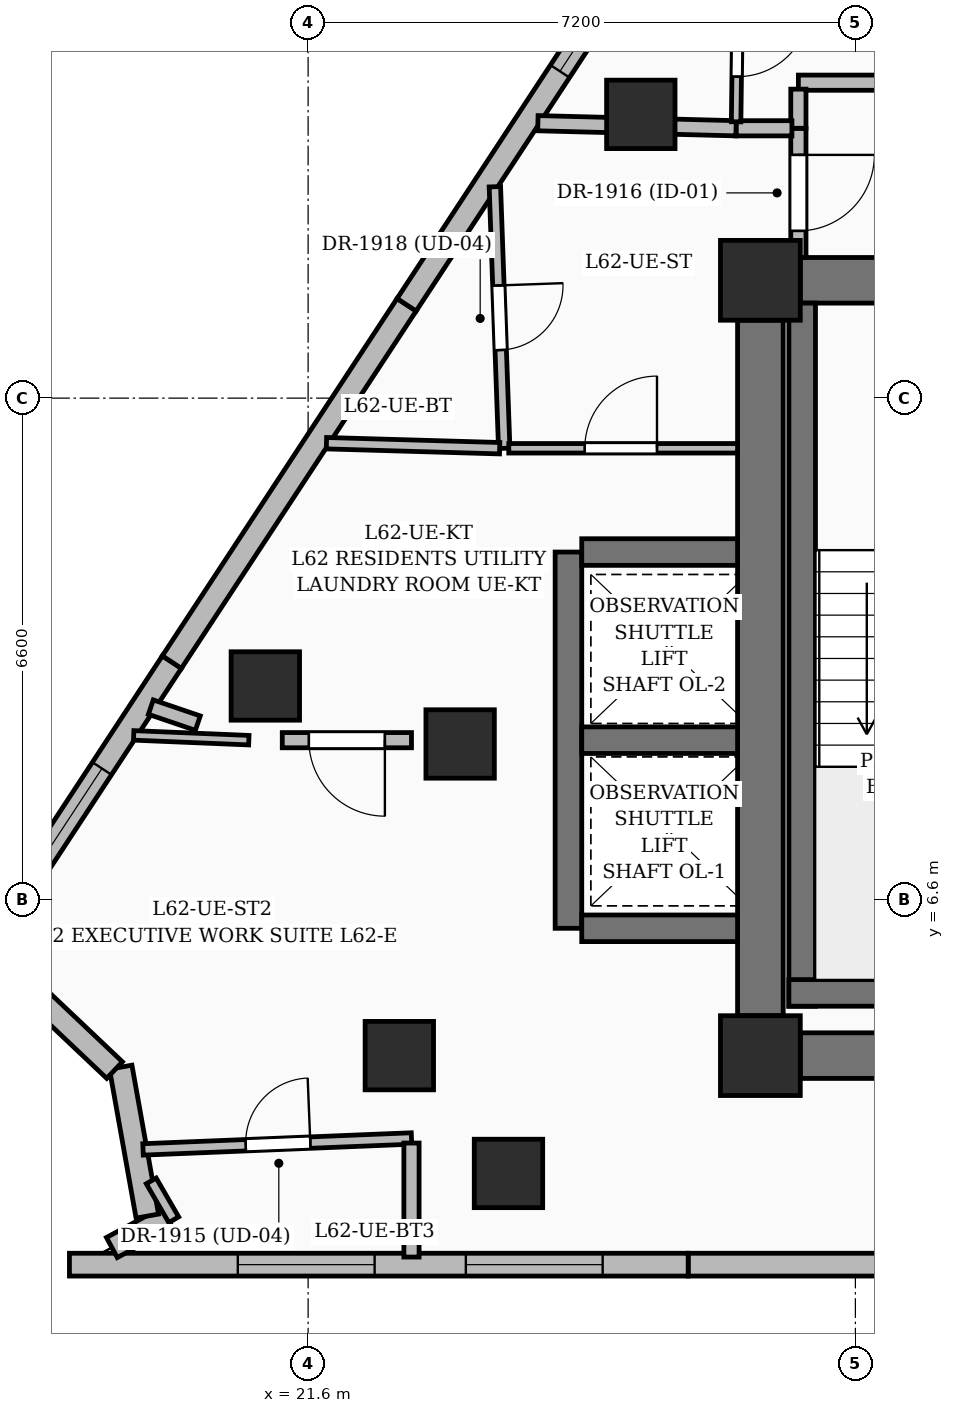
"""IFC4 building model, lengths in metres.
Left out: names, types, materials, properties, quantities, classifications, styles, units other than length and angle.
Written with IfcOpenShell. Run it as: python <this file> out.ifc"""

import sys

from ifc_helpers import new_model, si_unit, direction, frame, frame_2d, origin, origin_2d, place, context, subcontext, project, spatial, rectangle, extrude, element, fill, save


model = new_model("IFC4")
c1 = context("Model", 3, precision=1e-05, world=origin(), true_north=direction((0.0, 1.0)))
c2 = subcontext(c1, "Body", "Model", "MODEL_VIEW")
j1 = project(units=[si_unit("LENGTHUNIT", "METRE"), si_unit("PLANEANGLEUNIT", "RADIAN")], contexts=[c1])
p1 = place(None, origin())
s1 = spatial("IfcSite", under=j1, at=p1, CompositionType="ELEMENT")
p2 = place(p1, origin())
s2 = spatial("IfcBuilding", under=s1, at=p2, CompositionType="ELEMENT")
p3 = place(p2, frame((0.0, 0.0, 240.75)))
s3 = spatial("IfcBuildingStorey", under=s2, at=p3, CompositionType="ELEMENT", Elevation=240.75)
for number, where, z_axis, x_axis in (
    (1, (27.55, 4.55, 0.0), (0.0, 0.0, 1.0), (1.0, 0.0, 0.0)),
    (2, (27.55, 14.75, 0.0), (0.0, 0.0, 1.0), (1.0, 0.0, 0.0)),
):
    element("IfcColumn", number, at=place(p3, frame(where, z_axis=z_axis, x_axis=x_axis)), inside=s3, PredefinedType="COLUMN", context=c2, shape_type="SweptSolid", body=[
        extrude(rectangle(XDim=1.05, YDim=1.05, at=origin_2d()), origin(), (0.0, 0.0, 1.0), 3.75),
    ])
for number, where, z_axis, x_axis in (
    (3, (22.8, 4.55, 0.0), (0.0, 0.0, 1.0), (1.0, 0.0, 0.0)),
    (4, (23.6, 8.65, 0.0), (0.0, 0.0, 1.0), (1.0, 0.0, 0.0)),
):
    element("IfcColumn", number, at=place(p3, frame(where, z_axis=z_axis, x_axis=x_axis)), inside=s3, PredefinedType="COLUMN", context=c2, shape_type="SweptSolid", body=[
        extrude(rectangle(XDim=0.9, YDim=0.9, at=origin_2d()), origin(), (0.0, 0.0, 1.0), 3.75),
    ])
p4 = place(p3, frame((28.075, 4.55, 0.0), z_axis=(0.0, 0.0, 1.0), x_axis=(1.0, 0.0, 0.0)))
e5 = element("IfcWall", 5, at=p4, inside=s3, PredefinedType="SHEAR", context=c2, shape_type="SweptSolid", body=[
    extrude(rectangle(XDim=6.55, YDim=0.6, at=frame_2d((3.275, 0.0))), origin(), (0.0, 0.0, 1.0), 3.75),
])
p5 = place(p3, frame((28.075, 14.75, 0.0), z_axis=(0.0, 0.0, 1.0), x_axis=(1.0, 0.0, 0.0)))
e6 = element("IfcWall", 6, at=p5, inside=s3, PredefinedType="SHEAR", context=c2, shape_type="SweptSolid", body=[
    extrude(rectangle(XDim=6.55, YDim=0.6, at=frame_2d((3.275, 0.0))), origin(), (0.0, 0.0, 1.0), 3.75),
])
p6 = place(p5, frame((1.1, 0.0, 0.0)))
e7 = element("IfcOpeningElement", 7, at=p6, cuts=e6, PredefinedType="OPENING", context=c2, shape_type="SweptSolid", body=[
    extrude(rectangle(XDim=1.05, YDim=2.15, at=frame_2d((0.525, 1.075))), frame((0.0, 0.31, 0.0), z_axis=(0.0, -1.0, 0.0), x_axis=(1.0, 0.0, 0.0)), (0.0, 0.0, 1.0), 0.62),
])
p7 = place(p5, frame((5.46, 0.0, 0.0)))
e8 = element("IfcOpeningElement", 8, at=p7, cuts=e6, PredefinedType="OPENING", context=c2, shape_type="SweptSolid", body=[
    extrude(rectangle(XDim=0.95, YDim=2.15, at=frame_2d((0.475, 1.075))), frame((0.0, 0.31, 0.0), z_axis=(0.0, -1.0, 0.0), x_axis=(1.0, 0.0, 0.0)), (0.0, 0.0, 1.0), 0.62),
])
p8 = place(p3, frame((27.55, 5.075, 0.0), z_axis=(0.0, 0.0, 1.0), x_axis=(0.0, 1.0, 0.0)))
e9 = element("IfcWall", 9, at=p8, inside=s3, PredefinedType="SHEAR", context=c2, shape_type="SweptSolid", body=[
    extrude(rectangle(XDim=9.15, YDim=0.6, at=frame_2d((4.575, 0.0))), origin(), (0.0, 0.0, 1.0), 3.75),
])
p9 = place(p3, frame((28.1, 5.2, 0.0), z_axis=(0.0, 0.0, 1.0), x_axis=(0.0, 1.0, 0.0)))
e10 = element("IfcWall", 10, at=p9, inside=s3, PredefinedType="SOLIDWALL", context=c2, shape_type="SweptSolid", body=[
    extrude(rectangle(XDim=9.25, YDim=0.35, at=frame_2d((4.625, 0.0))), origin(), (0.0, 0.0, 1.0), 3.75),
])
p10 = place(p3, frame((27.925, 5.375, 0.0), z_axis=(0.0, 0.0, 1.0), x_axis=(1.0, 0.0, 0.0)))
e11 = element("IfcWall", 11, at=p10, inside=s3, PredefinedType="SOLIDWALL", context=c2, shape_type="SweptSolid", body=[
    extrude(rectangle(XDim=3.55, YDim=0.35, at=frame_2d((1.775, 0.0))), origin(), (0.0, 0.0, 1.0), 3.75),
])
p11 = place(p3, frame((25.025, 6.225, 0.0), z_axis=(0.0, 0.0, 1.0), x_axis=(0.0, 1.0, 0.0)))
e12 = element("IfcWall", 12, at=p11, inside=s3, PredefinedType="SOLIDWALL", context=c2, shape_type="SweptSolid", body=[
    extrude(rectangle(XDim=4.95, YDim=0.35, at=frame_2d((2.475, 0.0))), origin(), (0.0, 0.0, 1.0), 3.75),
])
for number, where, z_axis, x_axis in (
    (13, (25.2, 6.225, 0.0), (0.0, 0.0, 1.0), (1.0, 0.0, 0.0)),
    (14, (25.2, 8.7, 0.0), (0.0, 0.0, 1.0), (1.0, 0.0, 0.0)),
    (15, (25.2, 11.175, 0.0), (0.0, 0.0, 1.0), (1.0, 0.0, 0.0)),
):
    element("IfcWall", number, at=place(p3, frame(where, z_axis=z_axis, x_axis=x_axis)), inside=s3, PredefinedType="SOLIDWALL", context=c2, shape_type="SweptSolid", body=[
        extrude(rectangle(XDim=2.05, YDim=0.35, at=frame_2d((1.025, 0.0))), origin(), (0.0, 0.0, 1.0), 3.75),
    ])
for number, where, z_axis, x_axis in (
    (16, (24.236, 3.0, 0.0), (0.0, 0.0, 1.0), (1.0, 0.0, 0.0)),
    (17, (25.977, 16.933, 0.0), (0.0, 0.0, 1.0), (1.0, 0.0, 0.0)),
    (18, (21.037, 9.413, 0.0), (0.0, 0.0, 1.0), (1.0, 0.0, 0.0)),
):
    element("IfcColumn", number, at=place(p3, frame(where, z_axis=z_axis, x_axis=x_axis)), inside=s3, PredefinedType="COLUMN", context=c2, shape_type="SweptSolid", body=[
        extrude(rectangle(XDim=0.9, YDim=0.9, at=origin_2d()), origin(), (0.0, 0.0, 1.0), 3.75),
    ])
p12 = place(p3, frame((34.465, 1.8, 0.0), z_axis=(0.0, 0.0, 1.0), x_axis=(-1.0, 0.0, 0.0)))
e19 = element("IfcWall", 19, at=p12, inside=s3, PredefinedType="SOLIDWALL", context=c2, shape_type="SweptSolid", body=[
    extrude(rectangle(XDim=7.865, YDim=0.3, at=frame_2d((3.933, 0.0))), origin(), (0.0, 0.0, 1.0), 3.5),
])
p13 = place(p12, frame((2.7, 0.0, 0.55)))
e20 = element("IfcOpeningElement", 20, at=p13, cuts=e19, PredefinedType="OPENING", context=c2, shape_type="SweptSolid", body=[
    extrude(rectangle(XDim=2.1, YDim=2.4, at=frame_2d((1.05, 1.2))), frame((0.0, 0.16, 0.0), z_axis=(0.0, -1.0, 0.0), x_axis=(1.0, 0.0, 0.0)), (0.0, 0.0, 1.0), 0.32),
])
p14 = place(p3, frame((26.6, 1.8, 0.0), z_axis=(0.0, 0.0, 1.0), x_axis=(-1.0, 0.0, 0.0)))
e21 = element("IfcWall", 21, at=p14, inside=s3, PredefinedType="SOLIDWALL", context=c2, shape_type="SweptSolid", body=[
    extrude(rectangle(XDim=8.14, YDim=0.3, at=frame_2d((4.07, 0.0))), origin(), (0.0, 0.0, 1.0), 3.5),
])
p15 = place(p14, frame((4.125, 0.0, 0.6)))
e22 = element("IfcOpeningElement", 22, at=p15, cuts=e21, PredefinedType="OPENING", context=c2, shape_type="SweptSolid", body=[
    extrude(rectangle(XDim=1.8, YDim=2.1, at=frame_2d((0.9, 1.05))), frame((0.0, 0.16, 0.0), z_axis=(0.0, -1.0, 0.0), x_axis=(1.0, 0.0, 0.0)), (0.0, 0.0, 1.0), 0.32),
])
p16 = place(p14, frame((1.125, 0.0, 0.6)))
e23 = element("IfcOpeningElement", 23, at=p16, cuts=e21, PredefinedType="OPENING", context=c2, shape_type="SweptSolid", body=[
    extrude(rectangle(XDim=1.8, YDim=2.1, at=frame_2d((0.9, 1.05))), frame((0.0, 0.16, 0.0), z_axis=(0.0, -1.0, 0.0), x_axis=(1.0, 0.0, 0.0)), (0.0, 0.0, 1.0), 0.32),
])
p17 = place(p3, frame((19.018, 2.025, 0.0), z_axis=(0.0, 0.0, 1.0), x_axis=(0.880196276444, 0.474609855496, 0.0)))
e24 = element("IfcWall", 24, at=p17, inside=s3, PredefinedType="SOLIDWALL", context=c2, shape_type="SweptSolid", body=[
    extrude(rectangle(XDim=0.828, YDim=0.3, at=frame_2d((0.414, 0.0))), origin(), (0.0, 0.0, 1.0), 3.5),
])
p18 = place(p3, frame((19.485, 2.439, 0.0), z_axis=(0.0, 0.0, 1.0), x_axis=(-0.175926512458, 0.984403302623, 0.0)))
e25 = element("IfcWall", 25, at=p18, inside=s3, PredefinedType="SOLIDWALL", context=c2, shape_type="SweptSolid", body=[
    extrude(rectangle(XDim=1.99, YDim=0.3, at=frame_2d((0.995, 0.0))), origin(), (0.0, 0.0, 1.0), 3.5),
])
p19 = place(p3, frame((19.054, 4.36, 0.0), z_axis=(0.0, 0.0, 1.0), x_axis=(-0.726119894398, 0.68756810496, 0.0)))
e26 = element("IfcWall", 26, at=p19, inside=s3, PredefinedType="SOLIDWALL", context=c2, shape_type="SweptSolid", body=[
    extrude(rectangle(XDim=1.995, YDim=0.3, at=frame_2d((0.998, 0.0))), origin(), (0.0, 0.0, 1.0), 3.5),
])
p20 = place(p3, frame((17.062, 5.548, 0.0), z_axis=(0.0, 0.0, 1.0), x_axis=(0.549053158856, 0.835787430361, 0.0)))
e27 = element("IfcWall", 27, at=p20, inside=s3, PredefinedType="SOLIDWALL", context=c2, shape_type="SweptSolid", body=[
    extrude(rectangle(XDim=5.0, YDim=0.3, at=frame_2d((2.5, 0.0))), origin(), (0.0, 0.0, 1.0), 3.5),
])
p21 = place(p20, frame((1.225, 0.0, 0.55)))
e28 = element("IfcOpeningElement", 28, at=p21, cuts=e27, PredefinedType="OPENING", context=c2, shape_type="SweptSolid", body=[
    extrude(rectangle(XDim=2.1, YDim=2.4, at=frame_2d((1.05, 1.2))), frame((0.0, 0.16, 0.0), z_axis=(0.0, -1.0, 0.0), x_axis=(1.0, 0.0, 0.0)), (0.0, 0.0, 1.0), 0.32),
])
p22 = place(p3, frame((19.807, 9.727, 0.0), z_axis=(0.0, 0.0, 1.0), x_axis=(0.549047957694, 0.835790847134, 0.0)))
e29 = element("IfcWall", 29, at=p22, inside=s3, PredefinedType="SOLIDWALL", context=c2, shape_type="SweptSolid", body=[
    extrude(rectangle(XDim=5.625, YDim=0.3, at=frame_2d((2.812, 0.0))), origin(), (0.0, 0.0, 1.0), 3.5),
])
p23 = place(p3, frame((22.896, 14.428, 0.0), z_axis=(0.0, 0.0, 1.0), x_axis=(0.549084999381, 0.835766512523, 0.0)))
e30 = element("IfcWall", 30, at=p23, inside=s3, PredefinedType="SOLIDWALL", context=c2, shape_type="SweptSolid", body=[
    extrude(rectangle(XDim=5.35, YDim=0.3, at=frame_2d((2.675, 0.0))), origin(), (0.0, 0.0, 1.0), 3.5),
])
p24 = place(p23, frame((3.675, 0.0, 0.8)))
e31 = element("IfcOpeningElement", 31, at=p24, cuts=e30, PredefinedType="OPENING", context=c2, shape_type="SweptSolid", body=[
    extrude(rectangle(XDim=1.2, YDim=1.8, at=frame_2d((0.6, 0.9))), frame((0.0, 0.16, 0.0), z_axis=(0.0, -1.0, 0.0), x_axis=(1.0, 0.0, 0.0)), (0.0, 0.0, 1.0), 0.32),
])
p25 = place(p3, frame((28.05, 16.75, 0.0), z_axis=(0.0, 0.0, 1.0), x_axis=(0.0, -1.0, 0.0)))
e32 = element("IfcWall", 32, at=p25, inside=s3, PredefinedType="PARTITIONING", context=c2, shape_type="SweptSolid", body=[
    extrude(rectangle(XDim=1.7, YDim=0.2, at=frame_2d((0.85, 0.0))), origin(), (0.0, 0.0, 1.0), 3.5),
])
p26 = place(p25, frame((0.35, 0.0, 0.0)))
e33 = element("IfcOpeningElement", 33, at=p26, cuts=e32, PredefinedType="OPENING", context=c2, shape_type="SweptSolid", body=[
    extrude(rectangle(XDim=1.0, YDim=2.2, at=frame_2d((0.5, 1.1))), frame((0.0, 0.11, 0.0), z_axis=(0.0, -1.0, 0.0), x_axis=(1.0, 0.0, 0.0)), (0.0, 0.0, 1.0), 0.22),
])
p27 = place(p3, frame((34.02, 17.35, 0.0), z_axis=(0.0, 0.0, 1.0), x_axis=(-1.0, 0.0, 0.0)))
e34 = element("IfcWall", 34, at=p27, inside=s3, PredefinedType="PARTITIONING", context=c2, shape_type="SweptSolid", body=[
    extrude(rectangle(XDim=5.97, YDim=0.2, at=frame_2d((2.985, 0.0))), origin(), (0.0, 0.0, 1.0), 2.685),
])
p28 = place(p27, frame((2.485, 0.0, 0.0)))
e35 = element("IfcOpeningElement", 35, at=p28, cuts=e34, PredefinedType="OPENING", context=c2, shape_type="SweptSolid", body=[
    extrude(rectangle(XDim=1.0, YDim=2.2, at=frame_2d((0.5, 1.1))), frame((0.0, 0.11, 0.0), z_axis=(0.0, -1.0, 0.0), x_axis=(1.0, 0.0, 0.0)), (0.0, 0.0, 1.0), 0.22),
])
p29 = place(p3, frame((28.05, 17.265, 0.0), z_axis=(0.0, 0.0, 1.0), x_axis=(0.0, -1.0, 0.0)))
e36 = element("IfcWall", 36, at=p29, inside=s3, PredefinedType="PARTITIONING", context=c2, shape_type="SweptSolid", body=[
    extrude(rectangle(XDim=0.515, YDim=0.2, at=frame_2d((0.257, 0.0))), origin(), (0.0, 0.0, 1.0), 3.5),
])
p30 = place(p3, frame((19.428, 3.316, 0.0), z_axis=(0.0, 0.0, 1.0), x_axis=(0.999169430966, 0.040748597793, 0.0)))
e37 = element("IfcWall", 37, at=p30, inside=s3, PredefinedType="PARTITIONING", context=c2, shape_type="SweptSolid", body=[
    extrude(rectangle(XDim=3.535, YDim=0.15, at=frame_2d((1.768, 0.0))), origin(), (0.0, 0.0, 1.0), 3.5),
])
p31 = place(p30, frame((1.353, 0.0, 0.0)))
e38 = element("IfcOpeningElement", 38, at=p31, cuts=e37, PredefinedType="OPENING", context=c2, shape_type="SweptSolid", body=[
    extrude(rectangle(XDim=0.85, YDim=2.1, at=frame_2d((0.425, 1.05))), frame((0.0, 0.085, 0.0), z_axis=(0.0, -1.0, 0.0), x_axis=(1.0, 0.0, 0.0)), (0.0, 0.0, 1.0), 0.17),
])
p32 = place(p3, frame((20.149, 8.925, 0.0), z_axis=(0.0, 0.0, 1.0), x_axis=(-0.946606200233, 0.322392155117, 0.0)))
e39 = element("IfcWall", 39, at=p32, inside=s3, PredefinedType="PARTITIONING", context=c2, shape_type="SweptSolid", body=[
    extrude(rectangle(XDim=0.653, YDim=0.2, at=frame_2d((0.326, 0.0))), origin(), (0.0, 0.0, 1.0), 3.5),
])
p33 = place(p3, frame((22.96, 8.7, 0.0), z_axis=(0.0, 0.0, 1.0), x_axis=(-1.0, 0.0, 0.0)))
e40 = element("IfcWall", 40, at=p33, inside=s3, PredefinedType="PARTITIONING", context=c2, shape_type="SweptSolid", body=[
    extrude(rectangle(XDim=1.7, YDim=0.2, at=frame_2d((0.85, 0.0))), origin(), (0.0, 0.0, 1.0), 2.764),
])
p34 = place(p33, frame((0.35, 0.0, 0.0)))
e41 = element("IfcOpeningElement", 41, at=p34, cuts=e40, PredefinedType="OPENING", context=c2, shape_type="SweptSolid", body=[
    extrude(rectangle(XDim=1.0, YDim=2.2, at=frame_2d((0.5, 1.1))), frame((0.0, 0.11, 0.0), z_axis=(0.0, -1.0, 0.0), x_axis=(1.0, 0.0, 0.0)), (0.0, 0.0, 1.0), 0.22),
])
p35 = place(p3, frame((22.96, 1.9, 0.0), z_axis=(0.0, 0.0, 1.0), x_axis=(0.0, 1.0, 0.0)))
e42 = element("IfcWall", 42, at=p35, inside=s3, PredefinedType="PARTITIONING", context=c2, shape_type="SweptSolid", body=[
    extrude(rectangle(XDim=1.5, YDim=0.2, at=frame_2d((0.75, 0.0))), origin(), (0.0, 0.0, 1.0), 3.5),
])
p36 = place(p3, frame((24.057, 15.981, 0.0), z_axis=(0.0, 0.0, 1.0), x_axis=(0.035737055387, -0.999361227421, 0.0)))
e43 = element("IfcWall", 43, at=p36, inside=s3, PredefinedType="PARTITIONING", context=c2, shape_type="SweptSolid", body=[
    extrude(rectangle(XDim=3.443, YDim=0.15, at=frame_2d((1.722, 0.0))), origin(), (0.0, 0.0, 1.0), 2.82),
])
p37 = place(p36, frame((1.3, 0.0, 0.0)))
e44 = element("IfcOpeningElement", 44, at=p37, cuts=e43, PredefinedType="OPENING", context=c2, shape_type="SweptSolid", body=[
    extrude(rectangle(XDim=0.85, YDim=2.1, at=frame_2d((0.425, 1.05))), frame((0.0, 0.085, 0.0), z_axis=(0.0, -1.0, 0.0), x_axis=(1.0, 0.0, 0.0)), (0.0, 0.0, 1.0), 0.17),
])
p38 = place(p3, frame((24.24, 12.54, 0.0), z_axis=(0.0, 0.0, 1.0), x_axis=(1.0, 0.0, 0.0)))
e45 = element("IfcWall", 45, at=p38, inside=s3, PredefinedType="PARTITIONING", context=c2, shape_type="SweptSolid", body=[
    extrude(rectangle(XDim=3.01, YDim=0.125, at=frame_2d((1.505, 0.0))), origin(), (0.0, 0.0, 1.0), 3.5),
])
p39 = place(p38, frame((1.0, 0.0, 0.0)))
e46 = element("IfcOpeningElement", 46, at=p39, cuts=e45, PredefinedType="OPENING", context=c2, shape_type="SweptSolid", body=[
    extrude(rectangle(XDim=0.95, YDim=2.2, at=frame_2d((0.475, 1.1))), frame((0.0, 0.072, 0.0), z_axis=(0.0, -1.0, 0.0), x_axis=(1.0, 0.0, 0.0)), (0.0, 0.0, 1.0), 0.145),
])
p40 = place(p3, frame((27.965, 16.75, 0.0), z_axis=(0.0, 0.0, 1.0), x_axis=(-1.0, 0.0, 0.0)))
e47 = element("IfcWall", 47, at=p40, inside=s3, PredefinedType="PARTITIONING", context=c2, shape_type="SweptSolid", body=[
    extrude(rectangle(XDim=0.735, YDim=0.2, at=frame_2d((0.368, 0.0))), origin(), (0.0, 0.0, 1.0), 3.5),
])
p41 = place(p3, frame((27.23, 16.75, 0.0), z_axis=(0.0, 0.0, 1.0), x_axis=(-0.999670938638, 0.025651792207, 0.0)))
e48 = element("IfcWall", 48, at=p41, inside=s3, PredefinedType="PARTITIONING", context=c2, shape_type="SweptSolid", body=[
    extrude(rectangle(XDim=2.608, YDim=0.2, at=frame_2d((1.304, 0.0))), origin(), (0.0, 0.0, 1.0), 3.5),
])
p42 = place(p3, frame((21.841, 12.607, 0.0), z_axis=(0.0, 0.0, 1.0), x_axis=(0.999585069317, -0.028804326047, 0.0)))
e49 = element("IfcWall", 49, at=p42, inside=s3, PredefinedType="PARTITIONING", context=c2, shape_type="SweptSolid", body=[
    extrude(rectangle(XDim=2.28, YDim=0.15, at=frame_2d((1.14, 0.0))), origin(), (0.0, 0.0, 1.0), 2.82),
])
p43 = place(p3, frame((27.254, 18.636, 0.0), z_axis=(0.0, 0.0, 1.0), x_axis=(-0.012876795935, -0.999917090626, 0.0)))
e50 = element("IfcWall", 50, at=p43, inside=s3, PredefinedType="PARTITIONING", context=c2, shape_type="SweptSolid", body=[
    extrude(rectangle(XDim=1.801, YDim=0.125, at=frame_2d((0.901, 0.0))), origin(), (0.0, 0.0, 1.0), 2.82),
])
p44 = place(p43, frame((0.257, 0.0, 0.0)))
e51 = element("IfcOpeningElement", 51, at=p44, cuts=e50, PredefinedType="OPENING", context=c2, shape_type="SweptSolid", body=[
    extrude(rectangle(XDim=0.95, YDim=2.2, at=frame_2d((0.475, 1.1))), frame((0.0, 0.072, 0.0), z_axis=(0.0, -1.0, 0.0), x_axis=(1.0, 0.0, 0.0)), (0.0, 0.0, 1.0), 0.145),
])
p45 = place(p3, frame((20.82, 8.7, 0.0), z_axis=(0.0, 0.0, 1.0), x_axis=(-0.999136974993, 0.041536793353, 0.0)))
e52 = element("IfcWall", 52, at=p45, inside=s3, PredefinedType="PARTITIONING", context=c2, shape_type="SweptSolid", body=[
    extrude(rectangle(XDim=1.516, YDim=0.125, at=frame_2d((0.758, 0.0))), origin(), (0.0, 0.0, 1.0), 3.5),
])
p46 = place(p3, frame((19.536, 2.902, 0.0), z_axis=(0.0, 0.0, 1.0), x_axis=(0.501427298818, -0.865199782709, 0.0)))
e53 = element("IfcWall", 53, at=p46, inside=s3, PredefinedType="PARTITIONING", context=c2, shape_type="SweptSolid", body=[
    extrude(rectangle(XDim=0.591, YDim=0.15, at=frame_2d((0.295, 0.0))), origin(), (0.0, 0.0, 1.0), 3.5),
])
p47 = place(p15, origin())
e54 = element("IfcWindow", 54, at=p47, inside=s3, PartitioningType="SINGLE_PANEL", PredefinedType="WINDOW", context=c2, shape_type="SweptSolid", body=[
    extrude(rectangle(XDim=1.8, YDim=2.1, at=frame_2d((0.9, 1.05))), frame((0.0, 0.03, 0.0), z_axis=(0.0, -1.0, 0.0), x_axis=(1.0, 0.0, 0.0)), (0.0, 0.0, 1.0), 0.06),
])
fill(e22, e54)
p48 = place(p16, origin())
e55 = element("IfcWindow", 55, at=p48, inside=s3, PartitioningType="SINGLE_PANEL", PredefinedType="WINDOW", context=c2, shape_type="SweptSolid", body=[
    extrude(rectangle(XDim=1.8, YDim=2.1, at=frame_2d((0.9, 1.05))), frame((0.0, 0.03, 0.0), z_axis=(0.0, -1.0, 0.0), x_axis=(1.0, 0.0, 0.0)), (0.0, 0.0, 1.0), 0.06),
])
fill(e23, e55)
p49 = place(p21, origin())
e56 = element("IfcWindow", 56, at=p49, inside=s3, PartitioningType="SINGLE_PANEL", PredefinedType="WINDOW", context=c2, shape_type="SweptSolid", body=[
    extrude(rectangle(XDim=2.1, YDim=2.4, at=frame_2d((1.05, 1.2))), frame((0.0, 0.03, 0.0), z_axis=(0.0, -1.0, 0.0), x_axis=(1.0, 0.0, 0.0)), (0.0, 0.0, 1.0), 0.06),
])
fill(e28, e56)
p50 = place(p24, origin())
e57 = element("IfcWindow", 57, at=p50, inside=s3, PartitioningType="SINGLE_PANEL", PredefinedType="WINDOW", context=c2, shape_type="SweptSolid", body=[
    extrude(rectangle(XDim=1.2, YDim=1.8, at=frame_2d((0.6, 0.9))), frame((0.0, 0.03, 0.0), z_axis=(0.0, -1.0, 0.0), x_axis=(1.0, 0.0, 0.0)), (0.0, 0.0, 1.0), 0.06),
])
fill(e31, e57)
p51 = place(p31, origin())
e58 = element("IfcDoor", 58, at=p51, inside=s3, OperationType="SINGLE_SWING_RIGHT", PredefinedType="DOOR", context=c2, shape_type="SweptSolid", body=[
    extrude(rectangle(XDim=0.85, YDim=2.1, at=frame_2d((0.425, 1.05))), frame((0.0, 0.025, 0.0), z_axis=(0.0, -1.0, 0.0), x_axis=(1.0, 0.0, 0.0)), (0.0, 0.0, 1.0), 0.05),
])
fill(e38, e58)
p52 = place(p26, origin())
e59 = element("IfcDoor", 59, at=p52, inside=s3, OperationType="SINGLE_SWING_LEFT", PredefinedType="DOOR", context=c2, shape_type="SweptSolid", body=[
    extrude(rectangle(XDim=1.0, YDim=2.2, at=frame_2d((0.5, 1.1))), frame((0.0, 0.025, 0.0), z_axis=(0.0, -1.0, 0.0), x_axis=(1.0, 0.0, 0.0)), (0.0, 0.0, 1.0), 0.05),
])
fill(e33, e59)
p53 = place(p39, origin())
e60 = element("IfcDoor", 60, at=p53, inside=s3, OperationType="SINGLE_SWING_RIGHT", PredefinedType="DOOR", context=c2, shape_type="SweptSolid", body=[
    extrude(rectangle(XDim=0.95, YDim=2.2, at=frame_2d((0.475, 1.1))), frame((0.0, 0.025, 0.0), z_axis=(0.0, -1.0, 0.0), x_axis=(1.0, 0.0, 0.0)), (0.0, 0.0, 1.0), 0.05),
])
fill(e46, e60)
p54 = place(p37, origin())
e61 = element("IfcDoor", 61, at=p54, inside=s3, OperationType="SINGLE_SWING_LEFT", PredefinedType="DOOR", context=c2, shape_type="SweptSolid", body=[
    extrude(rectangle(XDim=0.85, YDim=2.1, at=frame_2d((0.425, 1.05))), frame((0.0, 0.025, 0.0), z_axis=(0.0, -1.0, 0.0), x_axis=(1.0, 0.0, 0.0)), (0.0, 0.0, 1.0), 0.05),
])
fill(e44, e61)
p55 = place(p44, origin())
e62 = element("IfcDoor", 62, at=p55, inside=s3, OperationType="SINGLE_SWING_LEFT", PredefinedType="DOOR", context=c2, shape_type="SweptSolid", body=[
    extrude(rectangle(XDim=0.95, YDim=2.2, at=frame_2d((0.475, 1.1))), frame((0.0, 0.025, 0.0), z_axis=(0.0, -1.0, 0.0), x_axis=(1.0, 0.0, 0.0)), (0.0, 0.0, 1.0), 0.05),
])
fill(e51, e62)
p56 = place(p34, origin())
e63 = element("IfcDoor", 63, at=p56, inside=s3, OperationType="SINGLE_SWING_LEFT", PredefinedType="DOOR", context=c2, shape_type="SweptSolid", body=[
    extrude(rectangle(XDim=1.0, YDim=2.2, at=frame_2d((0.5, 1.1))), frame((0.0, 0.025, 0.0), z_axis=(0.0, -1.0, 0.0), x_axis=(1.0, 0.0, 0.0)), (0.0, 0.0, 1.0), 0.05),
])
fill(e41, e63)
save(model, sys.argv[1])
